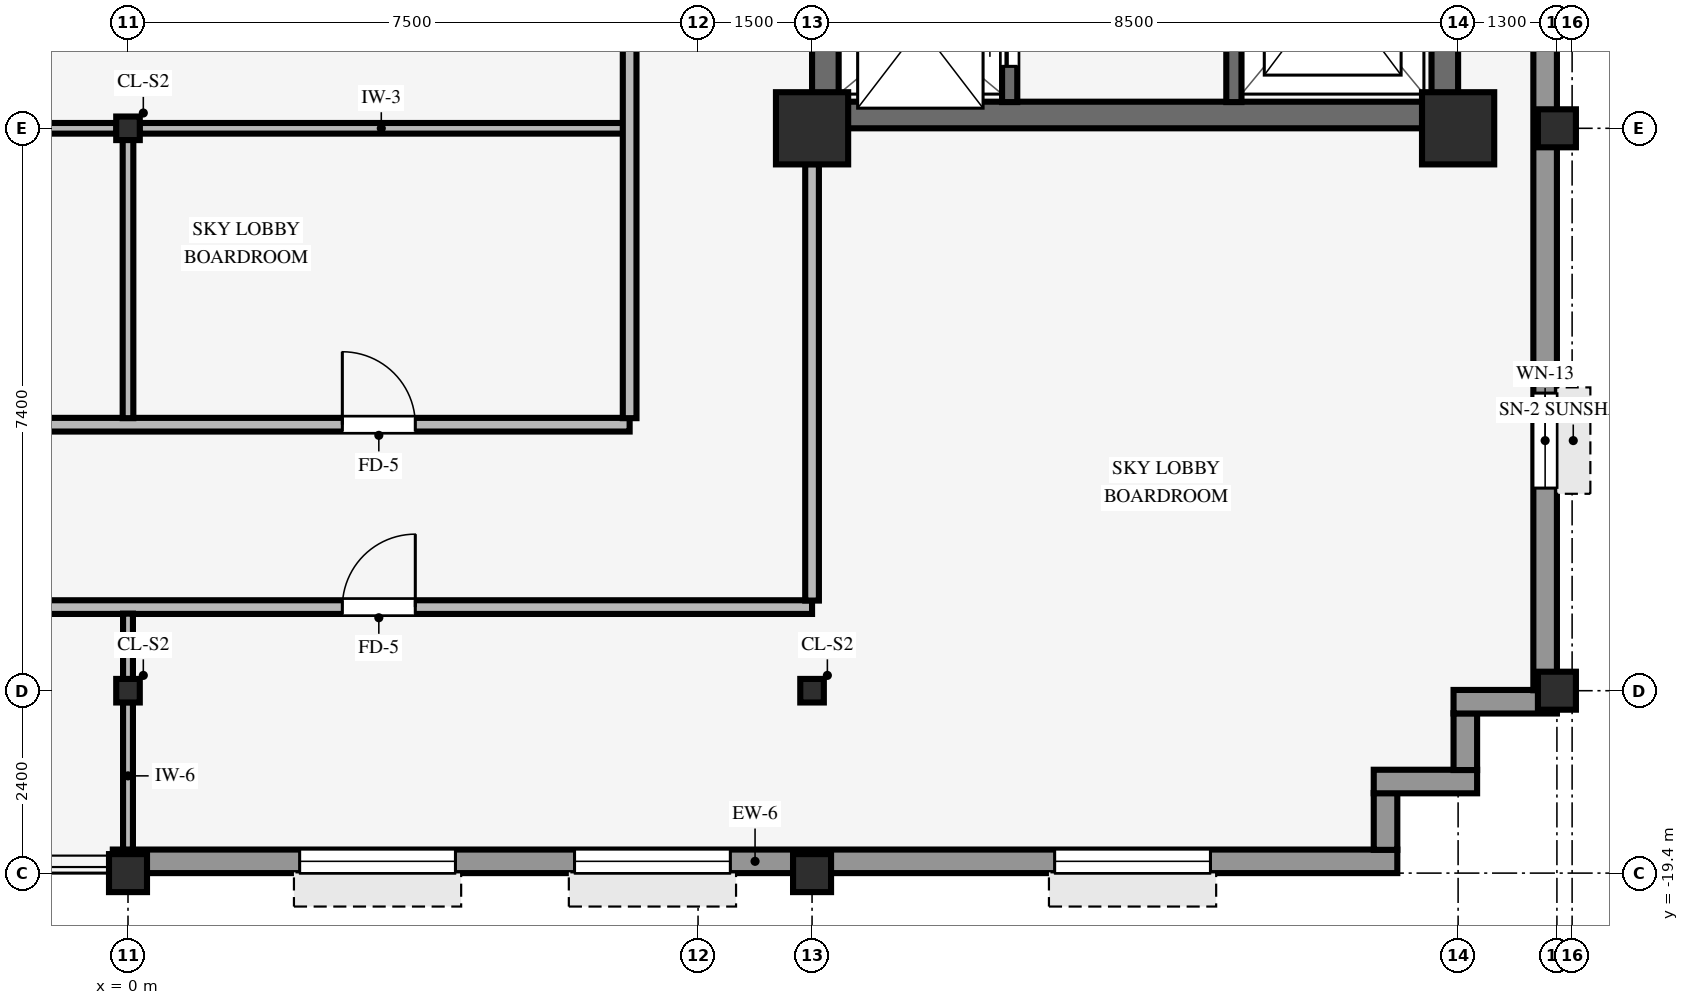
"""IFC4 building model, lengths in metres.
Left out: names, types, materials, properties, quantities, classifications, styles, units other than length and angle.
Written with IfcOpenShell. Run it as: python <this file> out.ifc"""

import sys

from ifc_helpers import new_model, si_unit, direction, frame, frame_2d, origin, origin_2d, place, context, subcontext, project, spatial, rectangle, hollow_rectangle, i_section, extrude, source, transform, mapped, element, fill, save


model = new_model("IFC4")
c1 = context("Model", 3, precision=1e-05, world=origin(), true_north=direction((0.0, 1.0)))
c2 = subcontext(c1, "Body", "Model", "MODEL_VIEW")
j1 = project(units=[si_unit("LENGTHUNIT", "METRE"), si_unit("PLANEANGLEUNIT", "RADIAN")], contexts=[c1])
p1 = place(None, origin())
s1 = spatial("IfcSite", under=j1, at=p1, CompositionType="ELEMENT")
p2 = place(p1, origin())
s2 = spatial("IfcBuilding", under=s1, at=p2, CompositionType="ELEMENT")
p3 = place(p2, frame((0.0, 0.0, 223.75)))
s3 = spatial("IfcBuildingStorey", under=s2, at=p3, CompositionType="ELEMENT", Elevation=223.75)
p4 = place(p3, frame((9.0, -9.425, 0.0), z_axis=(0.0, 0.0, 1.0), x_axis=(1.0, 0.0, 0.0)))
e1 = element("IfcWall", 1, at=p4, inside=s3, PredefinedType="SHEAR", context=c2, shape_type="SweptSolid", body=[
    extrude(rectangle(XDim=8.5, YDim=0.35, at=frame_2d((4.25, 0.0))), origin(), (0.0, 0.0, 1.0), 3.37),
])
p5 = place(p3, frame((9.175, -9.255, 0.0), z_axis=(0.0, 0.0, 1.0), x_axis=(0.0, 1.0, 0.0)))
e2 = element("IfcWall", 2, at=p5, inside=s3, PredefinedType="SHEAR", context=c2, shape_type="SweptSolid", body=[
    extrude(rectangle(XDim=18.51, YDim=0.35, at=frame_2d((9.255, 0.0))), origin(), (0.0, 0.0, 1.0), 3.37),
])
p6 = place(p5, frame((8.655, 0.0, 0.0)))
e3 = element("IfcOpeningElement", 3, at=p6, cuts=e2, PredefinedType="OPENING", context=c2, shape_type="SweptSolid", body=[
    extrude(rectangle(XDim=1.2, YDim=2.15, at=frame_2d((0.6, 1.075))), frame((0.0, 0.185, 0.0), z_axis=(0.0, -1.0, 0.0), x_axis=(1.0, 0.0, 0.0)), (0.0, 0.0, 1.0), 0.37),
])
p7 = place(p3, frame((17.325, -9.255, 0.0), z_axis=(0.0, 0.0, 1.0), x_axis=(0.0, 1.0, 0.0)))
e4 = element("IfcWall", 4, at=p7, inside=s3, PredefinedType="SHEAR", context=c2, shape_type="SweptSolid", body=[
    extrude(rectangle(XDim=18.51, YDim=0.35, at=frame_2d((9.255, 0.0))), origin(), (0.0, 0.0, 1.0), 3.37),
])
for number, where, z_axis, x_axis in (
    (5, (9.0, -9.6, 0.0), (0.0, 0.0, 1.0), (1.0, 0.0, 0.0)),
    (6, (17.5, -9.6, 0.0), (0.0, 0.0, 1.0), (1.0, 0.0, 0.0)),
):
    element("IfcColumn", number, at=place(p3, frame(where, z_axis=z_axis, x_axis=x_axis)), inside=s3, PredefinedType="COLUMN", context=c2, shape_type="SweptSolid", body=[
        extrude(rectangle(XDim=0.95, YDim=0.95, at=origin_2d()), origin(), (0.0, 0.0, 1.0), 3.37),
    ])
for number, where, z_axis, x_axis in (
    (7, (18.8, -17.0, 0.0), (0.0, 0.0, 1.0), (1.0, 0.0, 0.0)),
    (8, (18.8, -9.6, 0.0), (0.0, 0.0, 1.0), (1.0, 0.0, 0.0)),
    (9, (0.0, -19.4, 0.0), (0.0, 0.0, 1.0), (1.0, 0.0, 0.0)),
    (10, (9.0, -19.4, 0.0), (0.0, 0.0, 1.0), (1.0, 0.0, 0.0)),
):
    element("IfcColumn", number, at=place(p3, frame(where, z_axis=z_axis, x_axis=x_axis)), inside=s3, PredefinedType="COLUMN", context=c2, shape_type="SweptSolid", body=[
        extrude(hollow_rectangle(XDim=0.5, YDim=0.5, WallThickness=0.032, InnerFilletRadius=0.032, OuterFilletRadius=0.064, at=origin_2d()), origin(), (0.0, 0.0, 1.0), 3.37),
    ])
for number, where, z_axis, x_axis in (
    (11, (0.0, -17.0, 0.0), (0.0, 0.0, 1.0), (1.0, 0.0, 0.0)),
    (12, (0.0, -9.6, 0.0), (0.0, 0.0, 1.0), (1.0, 0.0, 0.0)),
    (13, (9.0, -17.0, 0.0), (0.0, 0.0, 1.0), (1.0, 0.0, 0.0)),
):
    element("IfcColumn", number, at=place(p3, frame(where, z_axis=z_axis, x_axis=x_axis)), inside=s3, PredefinedType="COLUMN", context=c2, shape_type="SweptSolid", body=[
        extrude(i_section(OverallWidth=0.31, OverallDepth=0.31, WebThickness=0.015, FlangeThickness=0.015, FilletRadius=0.015, at=origin_2d()), origin(), (0.0, 0.0, 1.0), 3.37),
    ])
p8 = place(p3, frame((-0.2, -19.245, 0.0), z_axis=(0.0, 0.0, 1.0), x_axis=(1.0, 0.0, 0.0)))
e14 = element("IfcWall", 14, at=p8, inside=s3, PredefinedType="STANDARD", context=c2, shape_type="SweptSolid", body=[
    extrude(rectangle(XDim=16.9, YDim=0.31, at=frame_2d((8.45, 0.0))), origin(), (0.0, 0.0, 1.0), 2.705),
])
p9 = place(p8, frame((2.458, 0.0, 0.8)))
e15 = element("IfcOpeningElement", 15, at=p9, cuts=e14, PredefinedType="OPENING", context=c2, shape_type="SweptSolid", body=[
    extrude(rectangle(XDim=2.05, YDim=1.52, at=frame_2d((1.025, 0.76))), frame((0.0, 0.165, 0.0), z_axis=(0.0, -1.0, 0.0), x_axis=(1.0, 0.0, 0.0)), (0.0, 0.0, 1.0), 0.33),
])
p10 = place(p8, frame((6.075, 0.0, 0.8)))
e16 = element("IfcOpeningElement", 16, at=p10, cuts=e14, PredefinedType="OPENING", context=c2, shape_type="SweptSolid", body=[
    extrude(rectangle(XDim=2.05, YDim=1.52, at=frame_2d((1.025, 0.76))), frame((0.0, 0.165, 0.0), z_axis=(0.0, -1.0, 0.0), x_axis=(1.0, 0.0, 0.0)), (0.0, 0.0, 1.0), 0.33),
])
p11 = place(p8, frame((12.392, 0.0, 0.8)))
e17 = element("IfcOpeningElement", 17, at=p11, cuts=e14, PredefinedType="OPENING", context=c2, shape_type="SweptSolid", body=[
    extrude(rectangle(XDim=2.05, YDim=1.52, at=frame_2d((1.025, 0.76))), frame((0.0, 0.165, 0.0), z_axis=(0.0, -1.0, 0.0), x_axis=(1.0, 0.0, 0.0)), (0.0, 0.0, 1.0), 0.33),
])
p12 = place(p3, frame((16.545, -19.094, 0.0), z_axis=(0.0, 0.0, 1.0), x_axis=(0.0, 1.0, 0.0)))
e18 = element("IfcWall", 18, at=p12, inside=s3, PredefinedType="STANDARD", context=c2, shape_type="SweptSolid", body=[
    extrude(rectangle(XDim=0.748, YDim=0.31, at=frame_2d((0.374, 0.0))), origin(), (0.0, 0.0, 1.0), 2.892),
])
p13 = place(p3, frame((16.39, -18.195, 0.0), z_axis=(0.0, 0.0, 1.0), x_axis=(1.0, 0.0, 0.0)))
e19 = element("IfcWall", 19, at=p13, inside=s3, PredefinedType="STANDARD", context=c2, shape_type="SweptSolid", body=[
    extrude(rectangle(XDim=1.36, YDim=0.31, at=frame_2d((0.68, 0.0))), origin(), (0.0, 0.0, 1.0), 2.892),
])
p14 = place(p3, frame((17.595, -18.044, 0.0), z_axis=(0.0, 0.0, 1.0), x_axis=(0.0, 1.0, 0.0)))
e20 = element("IfcWall", 20, at=p14, inside=s3, PredefinedType="STANDARD", context=c2, shape_type="SweptSolid", body=[
    extrude(rectangle(XDim=0.748, YDim=0.31, at=frame_2d((0.374, 0.0))), origin(), (0.0, 0.0, 1.0), 2.892),
])
p15 = place(p3, frame((17.44, -17.145, 0.0), z_axis=(0.0, 0.0, 1.0), x_axis=(1.0, 0.0, 0.0)))
e21 = element("IfcWall", 21, at=p15, inside=s3, PredefinedType="STANDARD", context=c2, shape_type="SweptSolid", body=[
    extrude(rectangle(XDim=1.36, YDim=0.31, at=frame_2d((0.68, 0.0))), origin(), (0.0, 0.0, 1.0), 2.892),
])
p16 = place(p3, frame((18.645, -16.994, 0.0), z_axis=(0.0, 0.0, 1.0), x_axis=(0.0, 1.0, 0.0)))
e22 = element("IfcWall", 22, at=p16, inside=s3, PredefinedType="STANDARD", context=c2, shape_type="SweptSolid", body=[
    extrude(rectangle(XDim=33.988, YDim=0.31, at=frame_2d((16.994, 0.0))), origin(), (0.0, 0.0, 1.0), 2.705),
])
p17 = place(p16, frame((30.774, 0.0, 0.0), z_axis=(0.0, 0.0, 1.0), x_axis=(-1.0, 0.0, 0.0)))
e23 = element("IfcOpeningElement", 23, at=p17, cuts=e22, PredefinedType="OPENING", context=c2, shape_type="SweptSolid", body=[
    extrude(rectangle(XDim=0.98, YDim=2.15, at=frame_2d((0.49, 1.075))), frame((0.0, 0.165, 0.0), z_axis=(0.0, -1.0, 0.0), x_axis=(1.0, 0.0, 0.0)), (0.0, 0.0, 1.0), 0.33),
])
p18 = place(p16, frame((2.66, 0.0, 0.8)))
e24 = element("IfcOpeningElement", 24, at=p18, cuts=e22, PredefinedType="OPENING", context=c2, shape_type="SweptSolid", body=[
    extrude(rectangle(XDim=1.25, YDim=1.52, at=frame_2d((0.625, 0.76))), frame((0.0, 0.165, 0.0), z_axis=(0.0, -1.0, 0.0), x_axis=(1.0, 0.0, 0.0)), (0.0, 0.0, 1.0), 0.33),
])
p19 = place(p16, frame((31.428, 0.0, 0.8)))
e25 = element("IfcOpeningElement", 25, at=p19, cuts=e22, PredefinedType="OPENING", context=c2, shape_type="SweptSolid", body=[
    extrude(rectangle(XDim=1.25, YDim=1.52, at=frame_2d((0.625, 0.76))), frame((0.0, 0.165, 0.0), z_axis=(0.0, -1.0, 0.0), x_axis=(1.0, 0.0, 0.0)), (0.0, 0.0, 1.0), 0.33),
])
p20 = place(p3, frame((14.55, -9.255, 0.0), z_axis=(0.0, 0.0, 1.0), x_axis=(0.0, 1.0, 0.0)))
e26 = element("IfcWall", 26, at=p20, inside=s3, PredefinedType="SHEAR", context=c2, shape_type="SweptSolid", body=[
    extrude(rectangle(XDim=10.16, YDim=0.2, at=frame_2d((5.08, 0.0))), origin(), (0.0, 0.0, 1.0), 3.37),
])
p21 = place(p20, frame((6.615, 0.0, 0.0)))
e27 = element("IfcOpeningElement", 27, at=p21, cuts=e26, PredefinedType="OPENING", context=c2, shape_type="SweptSolid", body=[
    extrude(rectangle(XDim=0.88, YDim=2.1, at=frame_2d((0.44, 1.05))), frame((0.0, 0.11, 0.0), z_axis=(0.0, -1.0, 0.0), x_axis=(1.0, 0.0, 0.0)), (0.0, 0.0, 1.0), 0.22),
])
p22 = place(p20, frame((0.98, 0.0, 0.0)))
e28 = element("IfcOpeningElement", 28, at=p22, cuts=e26, PredefinedType="OPENING", context=c2, shape_type="SweptSolid", body=[
    extrude(rectangle(XDim=1.15, YDim=2.15, at=frame_2d((0.575, 1.075))), frame((0.0, 0.11, 0.0), z_axis=(0.0, -1.0, 0.0), x_axis=(1.0, 0.0, 0.0)), (0.0, 0.0, 1.0), 0.22),
])
p23 = place(p3, frame((11.6, -9.255, 0.0), z_axis=(0.0, 0.0, 1.0), x_axis=(0.0, 1.0, 0.0)))
e29 = element("IfcWall", 29, at=p23, inside=s3, PredefinedType="SHEAR", context=c2, shape_type="SweptSolid", body=[
    extrude(rectangle(XDim=8.025, YDim=0.2, at=frame_2d((4.012, 0.0))), origin(), (0.0, 0.0, 1.0), 3.37),
])
p24 = place(p23, frame((0.47, 0.0, 0.0)))
e30 = element("IfcOpeningElement", 30, at=p24, cuts=e29, PredefinedType="OPENING", context=c2, shape_type="SweptSolid", body=[
    extrude(rectangle(XDim=1.05, YDim=2.15, at=frame_2d((0.525, 1.075))), frame((0.0, 0.11, 0.0), z_axis=(0.0, -1.0, 0.0), x_axis=(1.0, 0.0, 0.0)), (0.0, 0.0, 1.0), 0.22),
])
p25 = place(p23, frame((2.45, 0.0, 0.0)))
e31 = element("IfcOpeningElement", 31, at=p25, cuts=e29, PredefinedType="OPENING", context=c2, shape_type="SweptSolid", body=[
    extrude(rectangle(XDim=1.05, YDim=2.15, at=frame_2d((0.525, 1.075))), frame((0.0, 0.11, 0.0), z_axis=(0.0, -1.0, 0.0), x_axis=(1.0, 0.0, 0.0)), (0.0, 0.0, 1.0), 0.22),
])
p26 = place(p23, frame((4.43, 0.0, 0.0)))
e32 = element("IfcOpeningElement", 32, at=p26, cuts=e29, PredefinedType="OPENING", context=c2, shape_type="SweptSolid", body=[
    extrude(rectangle(XDim=1.05, YDim=2.15, at=frame_2d((0.525, 1.075))), frame((0.0, 0.11, 0.0), z_axis=(0.0, -1.0, 0.0), x_axis=(1.0, 0.0, 0.0)), (0.0, 0.0, 1.0), 0.22),
])
p27 = place(p23, frame((6.41, 0.0, 0.0)))
e33 = element("IfcOpeningElement", 33, at=p27, cuts=e29, PredefinedType="OPENING", context=c2, shape_type="SweptSolid", body=[
    extrude(rectangle(XDim=1.05, YDim=2.15, at=frame_2d((0.525, 1.075))), frame((0.0, 0.11, 0.0), z_axis=(0.0, -1.0, 0.0), x_axis=(1.0, 0.0, 0.0)), (0.0, 0.0, 1.0), 0.22),
])
p28 = place(p3, frame((-26.09, -15.9, 0.0), z_axis=(0.0, 0.0, 1.0), x_axis=(1.0, 0.0, 0.0)))
e34 = element("IfcWall", 34, at=p28, inside=s3, PredefinedType="PARTITIONING", context=c2, shape_type="SweptSolid", body=[
    extrude(rectangle(XDim=35.09, YDim=0.18, at=frame_2d((17.545, 0.0))), origin(), (0.0, 0.0, 1.0), 3.36),
])
p29 = place(p28, frame((17.51, 0.0, 0.0)))
e35 = element("IfcOpeningElement", 35, at=p29, cuts=e34, PredefinedType="OPENING", context=c2, shape_type="SweptSolid", body=[
    extrude(rectangle(XDim=0.96, YDim=2.1, at=frame_2d((0.48, 1.05))), frame((0.0, 0.1, 0.0), z_axis=(0.0, -1.0, 0.0), x_axis=(1.0, 0.0, 0.0)), (0.0, 0.0, 1.0), 0.2),
])
p30 = place(p28, frame((28.91, 0.0, 0.0)))
e36 = element("IfcOpeningElement", 36, at=p30, cuts=e34, PredefinedType="OPENING", context=c2, shape_type="SweptSolid", body=[
    extrude(rectangle(XDim=0.96, YDim=2.1, at=frame_2d((0.48, 1.05))), frame((0.0, 0.1, 0.0), z_axis=(0.0, -1.0, 0.0), x_axis=(1.0, 0.0, 0.0)), (0.0, 0.0, 1.0), 0.2),
])
p31 = place(p3, frame((-17.7, -13.5, 0.0), z_axis=(0.0, 0.0, 1.0), x_axis=(1.0, 0.0, 0.0)))
e37 = element("IfcWall", 37, at=p31, inside=s3, PredefinedType="PARTITIONING", context=c2, shape_type="SweptSolid", body=[
    extrude(rectangle(XDim=24.3, YDim=0.18, at=frame_2d((12.15, 0.0))), origin(), (0.0, 0.0, 1.0), 3.049),
])
p32 = place(p31, frame((8.37, 0.0, 0.0)))
e38 = element("IfcOpeningElement", 38, at=p32, cuts=e37, PredefinedType="OPENING", context=c2, shape_type="SweptSolid", body=[
    extrude(rectangle(XDim=0.96, YDim=2.1, at=frame_2d((0.48, 1.05))), frame((0.0, 0.1, 0.0), z_axis=(0.0, -1.0, 0.0), x_axis=(1.0, 0.0, 0.0)), (0.0, 0.0, 1.0), 0.2),
])
p33 = place(p31, frame((20.52, 0.0, 0.0)))
e39 = element("IfcOpeningElement", 39, at=p33, cuts=e37, PredefinedType="OPENING", context=c2, shape_type="SweptSolid", body=[
    extrude(rectangle(XDim=0.96, YDim=2.1, at=frame_2d((0.48, 1.05))), frame((0.0, 0.1, 0.0), z_axis=(0.0, -1.0, 0.0), x_axis=(1.0, 0.0, 0.0)), (0.0, 0.0, 1.0), 0.2),
])
p34 = place(p3, frame((-8.529, -9.6, 0.0), z_axis=(0.0, 0.0, 1.0), x_axis=(1.0, 0.0, 0.0)))
e40 = element("IfcWall", 40, at=p34, inside=s3, PredefinedType="PARTITIONING", context=c2, shape_type="SweptSolid", body=[
    extrude(rectangle(XDim=8.378, YDim=0.14, at=frame_2d((4.189, 0.0))), origin(), (0.0, 0.0, 1.0), 2.405),
])
p35 = place(p3, frame((0.151, -9.6, 0.0), z_axis=(0.0, 0.0, 1.0), x_axis=(1.0, 0.0, 0.0)))
e41 = element("IfcWall", 41, at=p35, inside=s3, PredefinedType="PARTITIONING", context=c2, shape_type="SweptSolid", body=[
    extrude(rectangle(XDim=6.363, YDim=0.14, at=frame_2d((3.182, 0.0))), origin(), (0.0, 0.0, 1.0), 2.405),
])
p36 = place(p3, frame((0.0, -19.09, 0.0), z_axis=(0.0, 0.0, 1.0), x_axis=(0.0, 1.0, 0.0)))
e42 = element("IfcWall", 42, at=p36, inside=s3, PredefinedType="PARTITIONING", context=c2, shape_type="SweptSolid", body=[
    extrude(rectangle(XDim=1.939, YDim=0.13, at=frame_2d((0.97, 0.0))), origin(), (0.0, 0.0, 1.0), 2.892),
])
p37 = place(p3, frame((0.0, -16.849, 0.0), z_axis=(0.0, 0.0, 1.0), x_axis=(0.0, 1.0, 0.0)))
e43 = element("IfcWall", 43, at=p37, inside=s3, PredefinedType="PARTITIONING", context=c2, shape_type="SweptSolid", body=[
    extrude(rectangle(XDim=0.863, YDim=0.13, at=frame_2d((0.432, 0.0))), origin(), (0.0, 0.0, 1.0), 2.892),
])
p38 = place(p3, frame((0.0, -13.414, 0.0), z_axis=(0.0, 0.0, 1.0), x_axis=(0.0, 1.0, 0.0)))
e44 = element("IfcWall", 44, at=p38, inside=s3, PredefinedType="PARTITIONING", context=c2, shape_type="SweptSolid", body=[
    extrude(rectangle(XDim=3.663, YDim=0.14, at=frame_2d((1.832, 0.0))), origin(), (0.0, 0.0, 1.0), 2.892),
])
p39 = place(p3, frame((6.6, -13.414, 0.0), z_axis=(0.0, 0.0, 1.0), x_axis=(0.0, 1.0, 0.0)))
e45 = element("IfcWall", 45, at=p39, inside=s3, PredefinedType="PARTITIONING", context=c2, shape_type="SweptSolid", body=[
    extrude(rectangle(XDim=12.078, YDim=0.18, at=frame_2d((6.039, 0.0))), origin(), (0.0, 0.0, 1.0), 3.36),
])
p40 = place(p3, frame((9.0, -15.814, 0.0), z_axis=(0.0, 0.0, 1.0), x_axis=(0.0, 1.0, 0.0)))
e46 = element("IfcWall", 46, at=p40, inside=s3, PredefinedType="PARTITIONING", context=c2, shape_type="SweptSolid", body=[
    extrude(rectangle(XDim=5.743, YDim=0.18, at=frame_2d((2.872, 0.0))), origin(), (0.0, 0.0, 1.0), 2.892),
])
m1 = source(origin(), c2, "Body", "SweptSolid", [
    extrude(rectangle(XDim=2.05, YDim=1.52, at=frame_2d((1.025, 0.76))), frame((0.0, 0.03, 0.0), z_axis=(0.0, -1.0, 0.0), x_axis=(1.0, 0.0, 0.0)), (0.0, 0.0, 1.0), 0.06),
])
p41 = place(p9, origin())
e47 = element("IfcWindow", 47, at=p41, inside=s3, PartitioningType="SINGLE_PANEL", PredefinedType="WINDOW", context=c2, shape_type="MappedRepresentation", body=[
    mapped(m1, transform((0.0, 0.0, 0.0), scale=1.0)),
])
fill(e15, e47)
p42 = place(p10, origin())
e48 = element("IfcWindow", 48, at=p42, inside=s3, PartitioningType="SINGLE_PANEL", PredefinedType="WINDOW", context=c2, shape_type="MappedRepresentation", body=[
    mapped(m1, transform((0.0, 0.0, 0.0), scale=1.0)),
])
fill(e16, e48)
p43 = place(p11, origin())
e49 = element("IfcWindow", 49, at=p43, inside=s3, PartitioningType="SINGLE_PANEL", PredefinedType="WINDOW", context=c2, shape_type="MappedRepresentation", body=[
    mapped(m1, transform((0.0, 0.0, 0.0), scale=1.0)),
])
fill(e17, e49)
m2 = source(origin(), c2, "Body", "SweptSolid", [
    extrude(rectangle(XDim=1.25, YDim=1.52, at=frame_2d((0.625, 0.76))), frame((0.0, 0.03, 0.0), z_axis=(0.0, -1.0, 0.0), x_axis=(1.0, 0.0, 0.0)), (0.0, 0.0, 1.0), 0.06),
])
p44 = place(p18, origin())
e50 = element("IfcWindow", 50, at=p44, inside=s3, PartitioningType="SINGLE_PANEL", PredefinedType="WINDOW", context=c2, shape_type="MappedRepresentation", body=[
    mapped(m2, transform((0.0, 0.0, 0.0), scale=1.0)),
])
fill(e24, e50)
m3 = source(origin(), c2, "Body", "SweptSolid", [
    extrude(rectangle(XDim=1.05, YDim=2.15, at=frame_2d((0.525, 1.075))), frame((0.0, 0.025, 0.0), z_axis=(0.0, -1.0, 0.0), x_axis=(1.0, 0.0, 0.0)), (0.0, 0.0, 1.0), 0.05),
])
p45 = place(p24, origin())
e51 = element("IfcDoor", 51, at=p45, inside=s3, OperationType="DOUBLE_DOOR_SLIDING", PredefinedType="DOOR", context=c2, shape_type="MappedRepresentation", body=[
    mapped(m3, transform((0.0, 0.0, 0.0), scale=1.0)),
])
fill(e30, e51)
m4 = source(origin(), c2, "Body", "SweptSolid", [
    extrude(rectangle(XDim=0.96, YDim=2.1, at=frame_2d((0.48, 1.05))), frame((0.0, 0.025, 0.0), z_axis=(0.0, -1.0, 0.0), x_axis=(1.0, 0.0, 0.0)), (0.0, 0.0, 1.0), 0.05),
])
p46 = place(p30, origin())
e52 = element("IfcDoor", 52, at=p46, inside=s3, OperationType="SINGLE_SWING_RIGHT", PredefinedType="DOOR", context=c2, shape_type="MappedRepresentation", body=[
    mapped(m4, transform((0.0, 0.0, 0.0), scale=1.0)),
])
fill(e36, e52)
p47 = place(p33, origin())
e53 = element("IfcDoor", 53, at=p47, inside=s3, OperationType="SINGLE_SWING_LEFT", PredefinedType="DOOR", context=c2, shape_type="MappedRepresentation", body=[
    mapped(m4, transform((0.0, 0.0, 0.0), scale=1.0)),
])
fill(e39, e53)
save(model, sys.argv[1])
